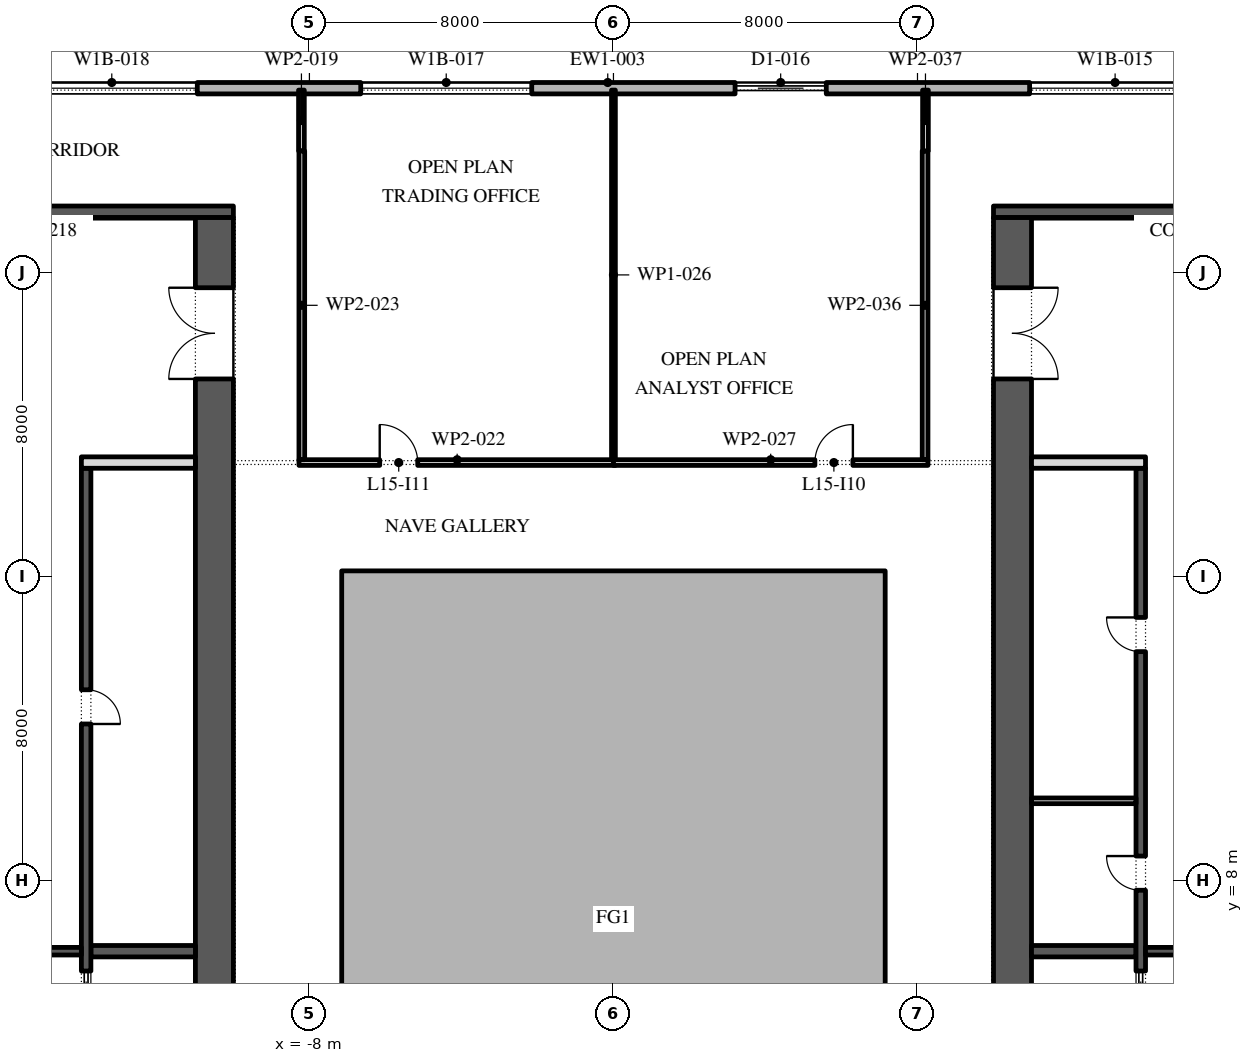
"""IFC4 building model, lengths in metres.
Left out: names, types, materials, properties, quantities, classifications, styles, units other than length and angle.
Written with IfcOpenShell. Run it as: python <this file> out.ifc"""

import sys

from ifc_helpers import new_model, si_unit, direction, frame, frame_2d, origin, place, context, subcontext, project, spatial, polyline, rectangle, outline, extrude, element, fill, save


model = new_model("IFC4")
c1 = context("Model", 3, precision=1e-05, world=origin(), true_north=direction((0.0, 1.0)))
c2 = subcontext(c1, "Body", "Model", "MODEL_VIEW")
j1 = project(units=[si_unit("LENGTHUNIT", "METRE"), si_unit("PLANEANGLEUNIT", "RADIAN")], contexts=[c1])
p1 = place(None, origin())
s1 = spatial("IfcSite", under=j1, at=p1, CompositionType="ELEMENT")
p2 = place(p1, origin())
s2 = spatial("IfcBuilding", under=s1, at=p2, CompositionType="ELEMENT")
p3 = place(p2, frame((0.0, 0.0, 73.2)))
s3 = spatial("IfcBuildingStorey", under=s2, at=p3, CompositionType="ELEMENT", Elevation=73.2)
p4 = place(p3, origin())
e1 = element("IfcWall", 1, at=p4, inside=s3, PredefinedType="STANDARD", context=c2, shape_type="SweptSolid", body=[
    extrude(outline(polyline([(-7.15, -2.15), (7.15, -2.15), (7.15, 16.15), (-7.15, 16.15), (-7.15, -2.15)]), holes=[polyline([(-7.0, -2.0), (-7.0, 16.0), (7.0, 16.0), (7.0, -2.0), (-7.0, -2.0)])]), origin(), (0.0, 0.0, 1.0), 4.0),
])
p5 = place(p3, frame((26.1, 28.85, 0.0), z_axis=(0.0, 0.0, 1.0), x_axis=(-1.0, 0.0, 0.0)))
e2 = element("IfcWall", 2, at=p5, inside=s3, PredefinedType="STANDARD", context=c2, shape_type="SweptSolid", body=[
    extrude(rectangle(XDim=52.5, YDim=0.3, at=frame_2d((26.25, 0.0))), origin(), (0.0, 0.0, 1.0), 4.0),
])
p6 = place(p5, frame((2.0, 0.0, 0.45)))
e3 = element("IfcOpeningElement", 3, at=p6, cuts=e2, PredefinedType="OPENING", context=c2, shape_type="SweptSolid", body=[
    extrude(rectangle(XDim=4.5, YDim=2.95, at=frame_2d((2.25, 1.475))), frame((0.0, 0.16, 0.0), z_axis=(0.0, -1.0, 0.0), x_axis=(1.0, 0.0, 0.0)), (0.0, 0.0, 1.0), 0.32),
])
p7 = place(p5, frame((10.65, 0.0, 0.45)))
e4 = element("IfcOpeningElement", 4, at=p7, cuts=e2, PredefinedType="OPENING", context=c2, shape_type="SweptSolid", body=[
    extrude(rectangle(XDim=4.5, YDim=2.95, at=frame_2d((2.25, 1.475))), frame((0.0, 0.16, 0.0), z_axis=(0.0, -1.0, 0.0), x_axis=(1.0, 0.0, 0.0)), (0.0, 0.0, 1.0), 0.32),
])
p8 = place(p5, frame((20.5, 0.0, 0.0)))
e5 = element("IfcOpeningElement", 5, at=p8, cuts=e2, PredefinedType="OPENING", context=c2, shape_type="SweptSolid", body=[
    extrude(rectangle(XDim=2.4, YDim=3.5, at=frame_2d((1.2, 1.75))), frame((0.0, 0.16, 0.0), z_axis=(0.0, -1.0, 0.0), x_axis=(1.0, 0.0, 0.0)), (0.0, 0.0, 1.0), 0.32),
])
p9 = place(p5, frame((28.25, 0.0, 0.45)))
e6 = element("IfcOpeningElement", 6, at=p9, cuts=e2, PredefinedType="OPENING", context=c2, shape_type="SweptSolid", body=[
    extrude(rectangle(XDim=4.5, YDim=2.95, at=frame_2d((2.25, 1.475))), frame((0.0, 0.16, 0.0), z_axis=(0.0, -1.0, 0.0), x_axis=(1.0, 0.0, 0.0)), (0.0, 0.0, 1.0), 0.32),
])
p10 = place(p5, frame((37.05, 0.0, 0.45)))
e7 = element("IfcOpeningElement", 7, at=p10, cuts=e2, PredefinedType="OPENING", context=c2, shape_type="SweptSolid", body=[
    extrude(rectangle(XDim=4.5, YDim=2.95, at=frame_2d((2.25, 1.475))), frame((0.0, 0.16, 0.0), z_axis=(0.0, -1.0, 0.0), x_axis=(1.0, 0.0, 0.0)), (0.0, 0.0, 1.0), 0.32),
])
p11 = place(p5, frame((45.85, 0.0, 0.45)))
e8 = element("IfcOpeningElement", 8, at=p11, cuts=e2, PredefinedType="OPENING", context=c2, shape_type="SweptSolid", body=[
    extrude(rectangle(XDim=4.5, YDim=2.95, at=frame_2d((2.25, 1.475))), frame((0.0, 0.16, 0.0), z_axis=(0.0, -1.0, 0.0), x_axis=(1.0, 0.0, 0.0)), (0.0, 0.0, 1.0), 0.32),
])
p12 = place(p3, frame((-10.5, -2.45, 0.0), z_axis=(0.0, 0.0, 1.0), x_axis=(0.0, 1.0, 0.0)))
e9 = element("IfcWall", 9, at=p12, inside=s3, PredefinedType="SHEAR", context=c2, shape_type="SweptSolid", body=[
    extrude(rectangle(XDim=27.9, YDim=1.0, at=frame_2d((13.95, 0.0))), origin(), (0.0, 0.0, 1.0), 4.0),
])
p13 = place(p12, frame((23.65, 0.0, 0.0)))
e10 = element("IfcOpeningElement", 10, at=p13, cuts=e9, PredefinedType="OPENING", context=c2, shape_type="SweptSolid", body=[
    extrude(rectangle(XDim=2.4, YDim=2.1, at=frame_2d((1.2, 1.05))), frame((0.0, 0.51, 0.0), z_axis=(0.0, -1.0, 0.0), x_axis=(1.0, 0.0, 0.0)), (0.0, 0.0, 1.0), 1.02),
])
p14 = place(p12, frame((1.087, 0.0, 0.0)))
e11 = element("IfcOpeningElement", 11, at=p14, cuts=e9, PredefinedType="OPENING", context=c2, shape_type="SweptSolid", body=[
    extrude(rectangle(XDim=0.9, YDim=2.1, at=frame_2d((0.45, 1.05))), frame((0.0, 0.51, 0.0), z_axis=(0.0, -1.0, 0.0), x_axis=(1.0, 0.0, 0.0)), (0.0, 0.0, 1.0), 1.02),
])
p15 = place(p12, frame((4.312, 0.0, 0.0)))
e12 = element("IfcOpeningElement", 12, at=p15, cuts=e9, PredefinedType="OPENING", context=c2, shape_type="SweptSolid", body=[
    extrude(rectangle(XDim=0.9, YDim=2.1, at=frame_2d((0.45, 1.05))), frame((0.0, 0.51, 0.0), z_axis=(0.0, -1.0, 0.0), x_axis=(1.0, 0.0, 0.0)), (0.0, 0.0, 1.0), 1.02),
])
p16 = place(p3, frame((-22.0, 25.6, 0.0), z_axis=(0.0, 0.0, 1.0), x_axis=(1.0, 0.0, 0.0)))
e13 = element("IfcWall", 13, at=p16, inside=s3, PredefinedType="SHEAR", context=c2, shape_type="SweptSolid", body=[
    extrude(rectangle(XDim=12.0, YDim=0.3, at=frame_2d((6.0, 0.0))), origin(), (0.0, 0.0, 1.0), 4.0),
])
p17 = place(p3, frame((-13.75, 6.143, 0.0), z_axis=(0.0, 0.0, 1.0), x_axis=(1.0, 0.0, 0.0)))
e14 = element("IfcWall", 14, at=p17, inside=s3, PredefinedType="SHEAR", context=c2, shape_type="SweptSolid", body=[
    extrude(rectangle(XDim=2.75, YDim=0.3, at=frame_2d((1.375, 0.0))), origin(), (0.0, 0.0, 1.0), 4.0),
])
p18 = place(p3, frame((-13.875, -2.45, 0.0), z_axis=(0.0, 0.0, 1.0), x_axis=(0.0, 1.0, 0.0)))
e15 = element("IfcWall", 15, at=p18, inside=s3, PredefinedType="SHEAR", context=c2, shape_type="SweptSolid", body=[
    extrude(rectangle(XDim=21.3, YDim=0.25, at=frame_2d((10.65, 0.0))), origin(), (0.0, 0.0, 1.0), 4.0),
])
p19 = place(p18, frame((14.571, 0.0, 0.0)))
e16 = element("IfcOpeningElement", 16, at=p19, cuts=e15, PredefinedType="OPENING", context=c2, shape_type="SweptSolid", body=[
    extrude(rectangle(XDim=0.9, YDim=2.1, at=frame_2d((0.45, 1.05))), frame((0.0, 0.135, 0.0), z_axis=(0.0, -1.0, 0.0), x_axis=(1.0, 0.0, 0.0)), (0.0, 0.0, 1.0), 0.27),
])
p20 = place(p18, frame((6.971, 0.0, 0.0)))
e17 = element("IfcOpeningElement", 17, at=p20, cuts=e15, PredefinedType="OPENING", context=c2, shape_type="SweptSolid", body=[
    extrude(rectangle(XDim=1.1, YDim=2.1, at=frame_2d((0.55, 1.05))), frame((0.0, 0.135, 0.0), z_axis=(0.0, -1.0, 0.0), x_axis=(1.0, 0.0, 0.0)), (0.0, 0.0, 1.0), 0.27),
])
p21 = place(p3, frame((-14.0, 19.0, 0.0), z_axis=(0.0, 0.0, 1.0), x_axis=(1.0, 0.0, 0.0)))
e18 = element("IfcWall", 18, at=p21, inside=s3, PredefinedType="PARTITIONING", context=c2, shape_type="SweptSolid", body=[
    extrude(rectangle(XDim=3.0, YDim=0.3, at=frame_2d((1.5, 0.0))), origin(), (0.0, 0.0, 1.0), 4.0),
])
p22 = place(p3, frame((-18.0, 6.143, 0.0), z_axis=(0.0, 0.0, 1.0), x_axis=(1.0, 0.0, 0.0)))
e19 = element("IfcWall", 19, at=p22, inside=s3, PredefinedType="SHEAR", context=c2, shape_type="SweptSolid", body=[
    extrude(rectangle(XDim=4.0, YDim=0.2, at=frame_2d((2.0, 0.0))), origin(), (0.0, 0.0, 1.0), 4.0),
])
p23 = place(p22, frame((1.4, 0.0, 0.0)))
e20 = element("IfcOpeningElement", 20, at=p23, cuts=e19, PredefinedType="OPENING", context=c2, shape_type="SweptSolid", body=[
    extrude(rectangle(XDim=1.2, YDim=2.1, at=frame_2d((0.6, 1.05))), frame((0.0, 0.11, 0.0), z_axis=(0.0, -1.0, 0.0), x_axis=(1.0, 0.0, 0.0)), (0.0, 0.0, 1.0), 0.22),
])
p24 = place(p3, frame((10.5, -2.45, 0.0), z_axis=(0.0, 0.0, 1.0), x_axis=(0.0, 1.0, 0.0)))
e21 = element("IfcWall", 21, at=p24, inside=s3, PredefinedType="SHEAR", context=c2, shape_type="SweptSolid", body=[
    extrude(rectangle(XDim=27.9, YDim=1.0, at=frame_2d((13.95, 0.0))), origin(), (0.0, 0.0, 1.0), 4.0),
])
p25 = place(p24, frame((23.65, 0.0, 0.0)))
e22 = element("IfcOpeningElement", 22, at=p25, cuts=e21, PredefinedType="OPENING", context=c2, shape_type="SweptSolid", body=[
    extrude(rectangle(XDim=2.4, YDim=2.1, at=frame_2d((1.2, 1.05))), frame((0.0, 0.51, 0.0), z_axis=(0.0, -1.0, 0.0), x_axis=(1.0, 0.0, 0.0)), (0.0, 0.0, 1.0), 1.02),
])
p26 = place(p24, frame((2.7, 0.0, 0.0)))
e23 = element("IfcOpeningElement", 23, at=p26, cuts=e21, PredefinedType="OPENING", context=c2, shape_type="SweptSolid", body=[
    extrude(rectangle(XDim=0.9, YDim=2.1, at=frame_2d((0.45, 1.05))), frame((0.0, 0.51, 0.0), z_axis=(0.0, -1.0, 0.0), x_axis=(1.0, 0.0, 0.0)), (0.0, 0.0, 1.0), 1.02),
])
p27 = place(p3, frame((10.0, 25.6, 0.0), z_axis=(0.0, 0.0, 1.0), x_axis=(1.0, 0.0, 0.0)))
e24 = element("IfcWall", 24, at=p27, inside=s3, PredefinedType="SHEAR", context=c2, shape_type="SweptSolid", body=[
    extrude(rectangle(XDim=12.0, YDim=0.3, at=frame_2d((6.0, 0.0))), origin(), (0.0, 0.0, 1.0), 4.0),
])
p28 = place(p3, frame((11.0, 6.143, 0.0), z_axis=(0.0, 0.0, 1.0), x_axis=(1.0, 0.0, 0.0)))
e25 = element("IfcWall", 25, at=p28, inside=s3, PredefinedType="SHEAR", context=c2, shape_type="SweptSolid", body=[
    extrude(rectangle(XDim=2.75, YDim=0.3, at=frame_2d((1.375, 0.0))), origin(), (0.0, 0.0, 1.0), 4.0),
])
p29 = place(p3, frame((13.875, -2.45, 0.0), z_axis=(0.0, 0.0, 1.0), x_axis=(0.0, 1.0, 0.0)))
e26 = element("IfcWall", 26, at=p29, inside=s3, PredefinedType="SHEAR", context=c2, shape_type="SweptSolid", body=[
    extrude(rectangle(XDim=21.3, YDim=0.25, at=frame_2d((10.65, 0.0))), origin(), (0.0, 0.0, 1.0), 4.0),
])
p30 = place(p29, frame((10.196, 0.0, 0.0)))
e27 = element("IfcOpeningElement", 27, at=p30, cuts=e26, PredefinedType="OPENING", context=c2, shape_type="SweptSolid", body=[
    extrude(rectangle(XDim=0.9, YDim=2.1, at=frame_2d((0.45, 1.05))), frame((0.0, 0.135, 0.0), z_axis=(0.0, -1.0, 0.0), x_axis=(1.0, 0.0, 0.0)), (0.0, 0.0, 1.0), 0.27),
])
p31 = place(p29, frame((16.475, 0.0, 0.0)))
e28 = element("IfcOpeningElement", 28, at=p31, cuts=e26, PredefinedType="OPENING", context=c2, shape_type="SweptSolid", body=[
    extrude(rectangle(XDim=0.9, YDim=2.1, at=frame_2d((0.45, 1.05))), frame((0.0, 0.135, 0.0), z_axis=(0.0, -1.0, 0.0), x_axis=(1.0, 0.0, 0.0)), (0.0, 0.0, 1.0), 0.27),
])
p32 = place(p29, frame((6.971, 0.0, 0.0)))
e29 = element("IfcOpeningElement", 29, at=p32, cuts=e26, PredefinedType="OPENING", context=c2, shape_type="SweptSolid", body=[
    extrude(rectangle(XDim=1.1, YDim=2.1, at=frame_2d((0.55, 1.05))), frame((0.0, 0.135, 0.0), z_axis=(0.0, -1.0, 0.0), x_axis=(1.0, 0.0, 0.0)), (0.0, 0.0, 1.0), 0.27),
])
p33 = place(p3, frame((11.0, 19.0, 0.0), z_axis=(0.0, 0.0, 1.0), x_axis=(1.0, 0.0, 0.0)))
e30 = element("IfcWall", 30, at=p33, inside=s3, PredefinedType="PARTITIONING", context=c2, shape_type="SweptSolid", body=[
    extrude(rectangle(XDim=3.0, YDim=0.3, at=frame_2d((1.5, 0.0))), origin(), (0.0, 0.0, 1.0), 4.0),
])
p34 = place(p3, frame((11.0, 10.1, 0.0), z_axis=(0.0, 0.0, 1.0), x_axis=(1.0, 0.0, 0.0)))
e31 = element("IfcWall", 31, at=p34, inside=s3, PredefinedType="PARTITIONING", context=c2, shape_type="SweptSolid", body=[
    extrude(rectangle(XDim=2.75, YDim=0.15, at=frame_2d((1.375, 0.0))), origin(), (0.0, 0.0, 1.0), 4.0),
])
p35 = place(p3, frame((14.0, 6.143, 0.0), z_axis=(0.0, 0.0, 1.0), x_axis=(1.0, 0.0, 0.0)))
e32 = element("IfcWall", 32, at=p35, inside=s3, PredefinedType="SHEAR", context=c2, shape_type="SweptSolid", body=[
    extrude(rectangle(XDim=4.0, YDim=0.2, at=frame_2d((2.0, 0.0))), origin(), (0.0, 0.0, 1.0), 4.0),
])
p36 = place(p35, frame((1.4, 0.0, 0.0)))
e33 = element("IfcOpeningElement", 33, at=p36, cuts=e32, PredefinedType="OPENING", context=c2, shape_type="SweptSolid", body=[
    extrude(rectangle(XDim=1.2, YDim=2.1, at=frame_2d((0.6, 1.05))), frame((0.0, 0.11, 0.0), z_axis=(0.0, -1.0, 0.0), x_axis=(1.0, 0.0, 0.0)), (0.0, 0.0, 1.0), 0.22),
])
p37 = place(p3, frame((-8.21, 28.8, 0.0), z_axis=(0.0, 0.0, 1.0), x_axis=(0.0, -1.0, 0.0)))
e34 = element("IfcWall", 34, at=p37, inside=s3, PredefinedType="PARTITIONING", context=c2, shape_type="SweptSolid", body=[
    extrude(rectangle(XDim=1.6, YDim=0.15, at=frame_2d((0.8, 0.0))), origin(), (0.0, 0.0, 1.0), 4.0),
])
p38 = place(p3, frame((-8.275, 19.0, 0.0), z_axis=(0.0, 0.0, 1.0), x_axis=(1.0, 0.0, 0.0)))
e35 = element("IfcWall", 35, at=p38, inside=s3, PredefinedType="PARTITIONING", context=c2, shape_type="SweptSolid", body=[
    extrude(rectangle(XDim=8.325, YDim=0.15, at=frame_2d((4.163, 0.0))), origin(), (0.0, 0.0, 1.0), 4.0),
])
p39 = place(p38, frame((2.125, 0.0, 0.0)))
e36 = element("IfcOpeningElement", 36, at=p39, cuts=e35, PredefinedType="OPENING", context=c2, shape_type="SweptSolid", body=[
    extrude(rectangle(XDim=1.0, YDim=2.1, at=frame_2d((0.5, 1.05))), frame((0.0, 0.085, 0.0), z_axis=(0.0, -1.0, 0.0), x_axis=(1.0, 0.0, 0.0)), (0.0, 0.0, 1.0), 0.17),
])
p40 = place(p3, frame((-8.2, 27.2, 0.0), z_axis=(0.0, 0.0, 1.0), x_axis=(0.0, -1.0, 0.0)))
e37 = element("IfcWall", 37, at=p40, inside=s3, PredefinedType="PARTITIONING", context=c2, shape_type="SweptSolid", body=[
    extrude(rectangle(XDim=8.125, YDim=0.15, at=frame_2d((4.062, 0.0))), origin(), (0.0, 0.0, 1.0), 4.0),
])
p41 = place(p3, frame((0.0, 19.075, 0.0), z_axis=(0.0, 0.0, 1.0), x_axis=(0.0, 1.0, 0.0)))
e38 = element("IfcWall", 38, at=p41, inside=s3, PredefinedType="PARTITIONING", context=c2, shape_type="SweptSolid", body=[
    extrude(rectangle(XDim=9.725, YDim=0.1, at=frame_2d((4.863, 0.0))), origin(), (0.0, 0.0, 1.0), 4.0),
])
p42 = place(p3, frame((0.0, 19.0, 0.0), z_axis=(0.0, 0.0, 1.0), x_axis=(1.0, 0.0, 0.0)))
e39 = element("IfcWall", 39, at=p42, inside=s3, PredefinedType="PARTITIONING", context=c2, shape_type="SweptSolid", body=[
    extrude(rectangle(XDim=8.275, YDim=0.15, at=frame_2d((4.137, 0.0))), origin(), (0.0, 0.0, 1.0), 4.0),
])
p43 = place(p42, frame((5.3, 0.0, 0.0)))
e40 = element("IfcOpeningElement", 40, at=p43, cuts=e39, PredefinedType="OPENING", context=c2, shape_type="SweptSolid", body=[
    extrude(rectangle(XDim=1.0, YDim=2.1, at=frame_2d((0.5, 1.05))), frame((0.0, 0.085, 0.0), z_axis=(0.0, -1.0, 0.0), x_axis=(1.0, 0.0, 0.0)), (0.0, 0.0, 1.0), 0.17),
])
p44 = place(p3, frame((8.2, 19.075, 0.0), z_axis=(0.0, 0.0, 1.0), x_axis=(0.0, 1.0, 0.0)))
e41 = element("IfcWall", 41, at=p44, inside=s3, PredefinedType="PARTITIONING", context=c2, shape_type="SweptSolid", body=[
    extrude(rectangle(XDim=8.125, YDim=0.15, at=frame_2d((4.062, 0.0))), origin(), (0.0, 0.0, 1.0), 4.0),
])
p45 = place(p3, frame((8.21, 27.2, 0.0), z_axis=(0.0, 0.0, 1.0), x_axis=(0.0, 1.0, 0.0)))
e42 = element("IfcWall", 42, at=p45, inside=s3, PredefinedType="PARTITIONING", context=c2, shape_type="SweptSolid", body=[
    extrude(rectangle(XDim=1.6, YDim=0.15, at=frame_2d((0.8, 0.0))), origin(), (0.0, 0.0, 1.0), 4.0),
])
p46 = place(p7, origin())
e43 = element("IfcWindow", 43, at=p46, inside=s3, PartitioningType="DOUBLE_PANEL_VERTICAL", PredefinedType="WINDOW", context=c2, shape_type="SweptSolid", body=[
    extrude(rectangle(XDim=4.5, YDim=2.95, at=frame_2d((2.25, 1.475))), frame((0.0, 0.03, 0.0), z_axis=(0.0, -1.0, 0.0), x_axis=(1.0, 0.0, 0.0)), (0.0, 0.0, 1.0), 0.06),
])
fill(e4, e43)
p47 = place(p8, origin())
e44 = element("IfcDoor", 44, at=p47, inside=s3, OperationType="DOUBLE_DOOR_SLIDING", PredefinedType="DOOR", context=c2, shape_type="SweptSolid", body=[
    extrude(rectangle(XDim=2.4, YDim=3.5, at=frame_2d((1.2, 1.75))), frame((0.0, 0.025, 0.0), z_axis=(0.0, -1.0, 0.0), x_axis=(1.0, 0.0, 0.0)), (0.0, 0.0, 1.0), 0.05),
])
fill(e5, e44)
p48 = place(p9, origin())
e45 = element("IfcWindow", 45, at=p48, inside=s3, PartitioningType="DOUBLE_PANEL_VERTICAL", PredefinedType="WINDOW", context=c2, shape_type="SweptSolid", body=[
    extrude(rectangle(XDim=4.5, YDim=2.95, at=frame_2d((2.25, 1.475))), frame((0.0, 0.03, 0.0), z_axis=(0.0, -1.0, 0.0), x_axis=(1.0, 0.0, 0.0)), (0.0, 0.0, 1.0), 0.06),
])
fill(e6, e45)
p49 = place(p10, origin())
e46 = element("IfcWindow", 46, at=p49, inside=s3, PartitioningType="DOUBLE_PANEL_VERTICAL", PredefinedType="WINDOW", context=c2, shape_type="SweptSolid", body=[
    extrude(rectangle(XDim=4.5, YDim=2.95, at=frame_2d((2.25, 1.475))), frame((0.0, 0.03, 0.0), z_axis=(0.0, -1.0, 0.0), x_axis=(1.0, 0.0, 0.0)), (0.0, 0.0, 1.0), 0.06),
])
fill(e7, e46)
p50 = place(p19, frame((0.9, -0.2, 0.0), z_axis=(0.0, 0.0, 1.0), x_axis=(-1.0, 0.0, 0.0)))
e47 = element("IfcDoor", 47, at=p50, inside=s3, OperationType="SINGLE_SWING_LEFT", PredefinedType="DOOR", context=c2, shape_type="SweptSolid", body=[
    extrude(rectangle(XDim=0.9, YDim=2.1, at=frame_2d((0.45, 1.05))), frame((0.0, -0.075, 0.0), z_axis=(0.0, -1.0, 0.0), x_axis=(1.0, 0.0, 0.0)), (0.0, 0.0, 1.0), 0.05),
])
fill(e16, e47)
p51 = place(p20, origin())
e48 = element("IfcDoor", 48, at=p51, inside=s3, OperationType="SLIDING_TO_LEFT", PredefinedType="DOOR", context=c2, shape_type="SweptSolid", body=[
    extrude(rectangle(XDim=1.1, YDim=2.1, at=frame_2d((0.55, 1.05))), frame((0.0, 0.025, 0.0), z_axis=(0.0, -1.0, 0.0), x_axis=(1.0, 0.0, 0.0)), (0.0, 0.0, 1.0), 0.05),
])
fill(e17, e48)
p52 = place(p13, origin())
e49 = element("IfcDoor", 49, at=p52, inside=s3, OperationType="DOUBLE_DOOR_SINGLE_SWING", PredefinedType="DOOR", context=c2, shape_type="SweptSolid", body=[
    extrude(rectangle(XDim=2.4, YDim=2.1, at=frame_2d((1.2, 1.05))), frame((0.0, 0.025, 0.0), z_axis=(0.0, -1.0, 0.0), x_axis=(1.0, 0.0, 0.0)), (0.0, 0.0, 1.0), 0.05),
])
fill(e10, e49)
p53 = place(p30, origin())
e50 = element("IfcDoor", 50, at=p53, inside=s3, OperationType="SINGLE_SWING_LEFT", PredefinedType="DOOR", context=c2, shape_type="SweptSolid", body=[
    extrude(rectangle(XDim=0.9, YDim=2.1, at=frame_2d((0.45, 1.05))), frame((0.0, 0.125, 0.0), z_axis=(0.0, -1.0, 0.0), x_axis=(1.0, 0.0, 0.0)), (0.0, 0.0, 1.0), 0.05),
])
fill(e27, e50)
p54 = place(p31, origin())
e51 = element("IfcDoor", 51, at=p54, inside=s3, OperationType="SINGLE_SWING_LEFT", PredefinedType="DOOR", context=c2, shape_type="SweptSolid", body=[
    extrude(rectangle(XDim=0.9, YDim=2.1, at=frame_2d((0.45, 1.05))), frame((0.0, 0.125, 0.0), z_axis=(0.0, -1.0, 0.0), x_axis=(1.0, 0.0, 0.0)), (0.0, 0.0, 1.0), 0.05),
])
fill(e28, e51)
p55 = place(p32, origin())
e52 = element("IfcDoor", 52, at=p55, inside=s3, OperationType="SLIDING_TO_LEFT", PredefinedType="DOOR", context=c2, shape_type="SweptSolid", body=[
    extrude(rectangle(XDim=1.1, YDim=2.1, at=frame_2d((0.55, 1.05))), frame((0.0, 0.025, 0.0), z_axis=(0.0, -1.0, 0.0), x_axis=(1.0, 0.0, 0.0)), (0.0, 0.0, 1.0), 0.05),
])
fill(e29, e52)
p56 = place(p25, frame((2.4, 0.0, 0.0), z_axis=(0.0, 0.0, 1.0), x_axis=(-1.0, 0.0, 0.0)))
e53 = element("IfcDoor", 53, at=p56, inside=s3, OperationType="DOUBLE_DOOR_SINGLE_SWING", PredefinedType="DOOR", context=c2, shape_type="SweptSolid", body=[
    extrude(rectangle(XDim=2.4, YDim=2.1, at=frame_2d((1.2, 1.05))), frame((0.0, 0.025, 0.0), z_axis=(0.0, -1.0, 0.0), x_axis=(1.0, 0.0, 0.0)), (0.0, 0.0, 1.0), 0.05),
])
fill(e22, e53)
p57 = place(p43, origin())
e54 = element("IfcDoor", 54, at=p57, inside=s3, OperationType="SINGLE_SWING_LEFT", PredefinedType="DOOR", context=c2, shape_type="SweptSolid", body=[
    extrude(rectangle(XDim=1.0, YDim=2.1, at=frame_2d((0.5, 1.05))), frame((0.0, 0.025, 0.0), z_axis=(0.0, -1.0, 0.0), x_axis=(1.0, 0.0, 0.0)), (0.0, 0.0, 1.0), 0.05),
])
fill(e40, e54)
p58 = place(p39, origin())
e55 = element("IfcDoor", 55, at=p58, inside=s3, OperationType="SINGLE_SWING_RIGHT", PredefinedType="DOOR", context=c2, shape_type="SweptSolid", body=[
    extrude(rectangle(XDim=1.0, YDim=2.1, at=frame_2d((0.5, 1.05))), frame((0.0, 0.025, 0.0), z_axis=(0.0, -1.0, 0.0), x_axis=(1.0, 0.0, 0.0)), (0.0, 0.0, 1.0), 0.05),
])
fill(e36, e55)
save(model, sys.argv[1])
